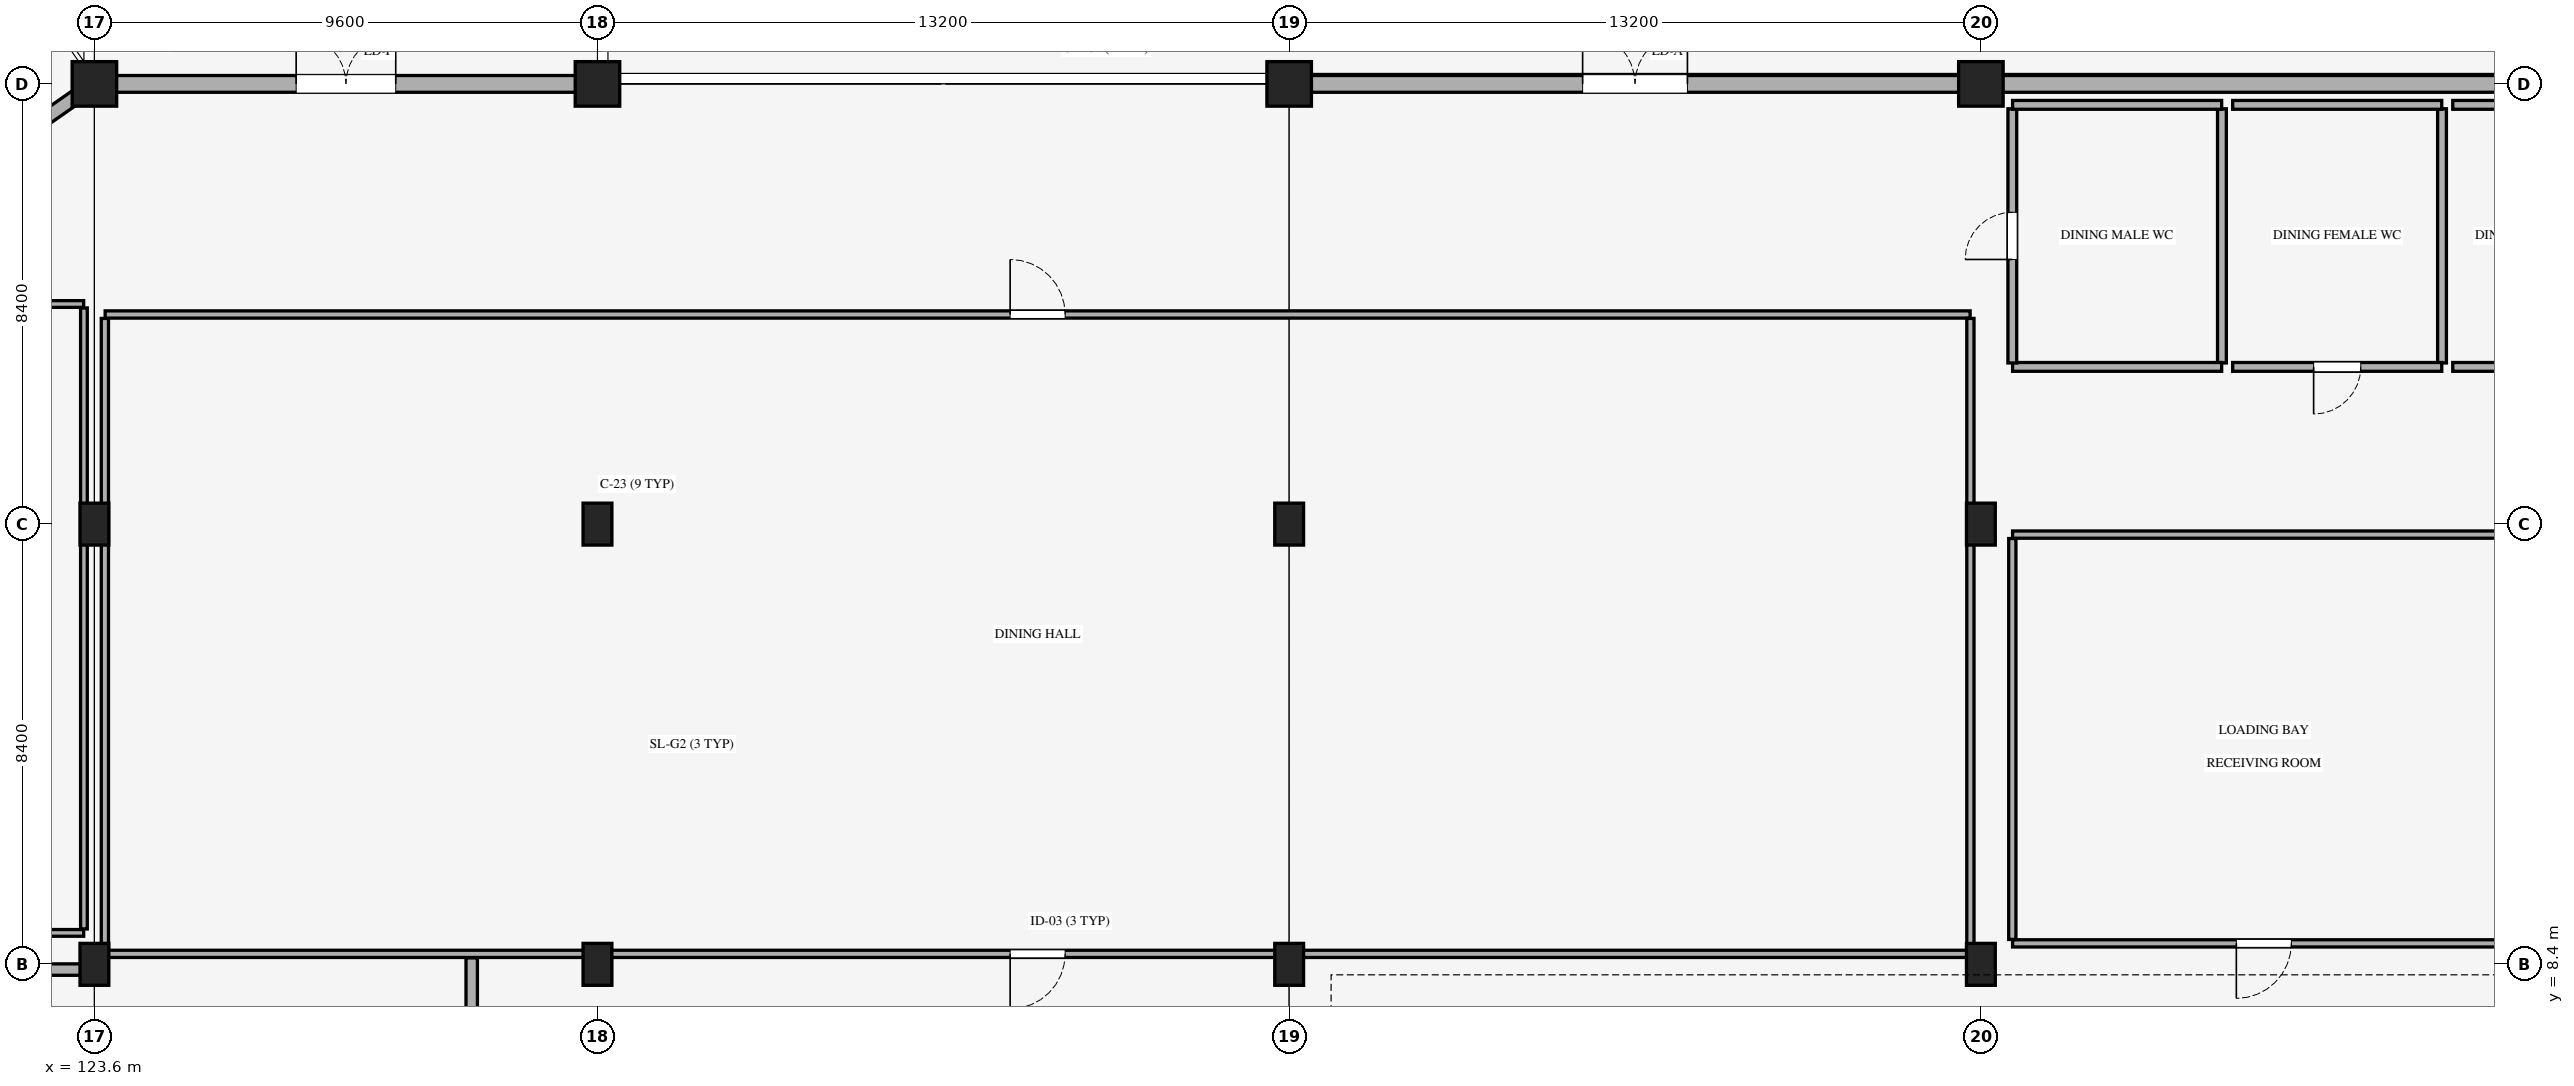
"""IFC4 building model, lengths in metres.
Left out: names, types, materials, properties, quantities, classifications, styles, units other than length and angle.
Written with IfcOpenShell. Run it as: python <this file> out.ifc"""

import sys

from ifc_helpers import new_model, si_unit, direction, frame, frame_2d, origin, origin_2d, place, context, subcontext, project, spatial, rectangle, extrude, element, fill, save


model = new_model("IFC4")
c1 = context("Model", 3, precision=1e-05, world=origin(), true_north=direction((0.0, 1.0)))
c2 = subcontext(c1, "Body", "Model", "MODEL_VIEW")
j1 = project(units=[si_unit("LENGTHUNIT", "METRE"), si_unit("PLANEANGLEUNIT", "RADIAN")], contexts=[c1])
p1 = place(None, origin())
s1 = spatial("IfcSite", under=j1, at=p1, CompositionType="ELEMENT")
p2 = place(p1, origin())
s2 = spatial("IfcBuilding", under=s1, at=p2, CompositionType="ELEMENT")
p3 = place(p2, origin())
s3 = spatial("IfcBuildingStorey", under=s2, at=p3, CompositionType="ELEMENT", Elevation=0.0)
for number, where, z_axis, x_axis in (
    (1, (123.6, 8.4, 0.0), (0.0, 0.0, 1.0), (1.0, 0.0, 0.0)),
    (2, (123.6, 16.8, 0.0), (0.0, 0.0, 1.0), (1.0, 0.0, 0.0)),
):
    element("IfcColumn", number, at=place(p3, frame(where, z_axis=z_axis, x_axis=x_axis)), inside=s3, PredefinedType="COLUMN", context=c2, shape_type="SweptSolid", body=[
        extrude(rectangle(XDim=0.55, YDim=0.8, at=origin_2d()), origin(), (0.0, 0.0, 1.0), 4.8),
    ])
p4 = place(p3, frame((123.6, 25.2, 0.0), z_axis=(0.0, 0.0, 1.0), x_axis=(1.0, 0.0, 0.0)))
e3 = element("IfcColumn", 3, at=p4, inside=s3, PredefinedType="COLUMN", context=c2, shape_type="SweptSolid", body=[
    extrude(rectangle(XDim=0.85, YDim=0.85, at=origin_2d()), origin(), (0.0, 0.0, 1.0), 4.8),
])
for number, where, z_axis, x_axis in (
    (4, (133.2, 8.4, 0.0), (0.0, 0.0, 1.0), (1.0, 0.0, 0.0)),
    (5, (133.2, 16.8, 0.0), (0.0, 0.0, 1.0), (1.0, 0.0, 0.0)),
):
    element("IfcColumn", number, at=place(p3, frame(where, z_axis=z_axis, x_axis=x_axis)), inside=s3, PredefinedType="COLUMN", context=c2, shape_type="SweptSolid", body=[
        extrude(rectangle(XDim=0.55, YDim=0.8, at=origin_2d()), origin(), (0.0, 0.0, 1.0), 4.8),
    ])
p5 = place(p3, frame((133.2, 25.2, 0.0), z_axis=(0.0, 0.0, 1.0), x_axis=(1.0, 0.0, 0.0)))
e6 = element("IfcColumn", 6, at=p5, inside=s3, PredefinedType="COLUMN", context=c2, shape_type="SweptSolid", body=[
    extrude(rectangle(XDim=0.85, YDim=0.85, at=origin_2d()), origin(), (0.0, 0.0, 1.0), 4.8),
])
for number, where, z_axis, x_axis in (
    (7, (146.4, 8.4, 0.0), (0.0, 0.0, 1.0), (1.0, 0.0, 0.0)),
    (8, (146.4, 16.8, 0.0), (0.0, 0.0, 1.0), (1.0, 0.0, 0.0)),
):
    element("IfcColumn", number, at=place(p3, frame(where, z_axis=z_axis, x_axis=x_axis)), inside=s3, PredefinedType="COLUMN", context=c2, shape_type="SweptSolid", body=[
        extrude(rectangle(XDim=0.55, YDim=0.8, at=origin_2d()), origin(), (0.0, 0.0, 1.0), 4.8),
    ])
p6 = place(p3, frame((146.4, 25.2, 0.0), z_axis=(0.0, 0.0, 1.0), x_axis=(1.0, 0.0, 0.0)))
e9 = element("IfcColumn", 9, at=p6, inside=s3, PredefinedType="COLUMN", context=c2, shape_type="SweptSolid", body=[
    extrude(rectangle(XDim=0.85, YDim=0.85, at=origin_2d()), origin(), (0.0, 0.0, 1.0), 4.8),
])
for number, where, z_axis, x_axis in (
    (10, (159.6, 8.4, 0.0), (0.0, 0.0, 1.0), (1.0, 0.0, 0.0)),
    (11, (159.6, 16.8, 0.0), (0.0, 0.0, 1.0), (1.0, 0.0, 0.0)),
):
    element("IfcColumn", number, at=place(p3, frame(where, z_axis=z_axis, x_axis=x_axis)), inside=s3, PredefinedType="COLUMN", context=c2, shape_type="SweptSolid", body=[
        extrude(rectangle(XDim=0.55, YDim=0.8, at=origin_2d()), origin(), (0.0, 0.0, 1.0), 4.8),
    ])
p7 = place(p3, frame((159.6, 25.2, 0.0), z_axis=(0.0, 0.0, 1.0), x_axis=(1.0, 0.0, 0.0)))
e12 = element("IfcColumn", 12, at=p7, inside=s3, PredefinedType="COLUMN", context=c2, shape_type="SweptSolid", body=[
    extrude(rectangle(XDim=0.85, YDim=0.85, at=origin_2d()), origin(), (0.0, 0.0, 1.0), 4.8),
])
p8 = place(p3, frame((121.961, 24.056, 0.0), z_axis=(0.0, 0.0, 1.0), x_axis=(0.819942937555, 0.572445263019, 0.0)))
e13 = element("IfcWall", 13, at=p8, inside=s3, PredefinedType="STANDARD", context=c2, shape_type="SweptSolid", body=[
    extrude(rectangle(XDim=1.999, YDim=0.268, at=frame_2d((0.999, 0.0))), origin(), (0.0, 0.0, 1.0), 2.98),
])
p9 = place(p3, frame((123.6, 25.2, 0.0), z_axis=(0.0, 0.0, 1.0), x_axis=(1.0, 0.0, 0.0)))
e14 = element("IfcWall", 14, at=p9, inside=s3, PredefinedType="STANDARD", context=c2, shape_type="SweptSolid", body=[
    extrude(rectangle(XDim=9.6, YDim=0.32, at=frame_2d((4.8, 0.0))), origin(), (0.0, 0.0, 1.0), 2.98),
])
p10 = place(p9, frame((3.85, 0.0, 0.0)))
e15 = element("IfcOpeningElement", 15, at=p10, cuts=e14, PredefinedType="OPENING", context=c2, shape_type="SweptSolid", body=[
    extrude(rectangle(XDim=1.9, YDim=2.25, at=frame_2d((0.95, 1.125))), frame((0.0, 0.17, 0.0), z_axis=(0.0, -1.0, 0.0), x_axis=(1.0, 0.0, 0.0)), (0.0, 0.0, 1.0), 0.34),
])
p11 = place(p3, frame((146.4, 25.2, 0.0), z_axis=(0.0, 0.0, 1.0), x_axis=(1.0, 0.0, 0.0)))
e16 = element("IfcWall", 16, at=p11, inside=s3, PredefinedType="STANDARD", context=c2, shape_type="SweptSolid", body=[
    extrude(rectangle(XDim=13.2, YDim=0.32, at=frame_2d((6.6, 0.0))), origin(), (0.0, 0.0, 1.0), 3.62),
])
p12 = place(p11, frame((5.6, 0.0, 0.0)))
e17 = element("IfcOpeningElement", 17, at=p12, cuts=e16, PredefinedType="OPENING", context=c2, shape_type="SweptSolid", body=[
    extrude(rectangle(XDim=2.0, YDim=2.4, at=frame_2d((1.0, 1.2))), frame((0.0, 0.17, 0.0), z_axis=(0.0, -1.0, 0.0), x_axis=(1.0, 0.0, 0.0)), (0.0, 0.0, 1.0), 0.34),
])
p13 = place(p3, frame((159.6, 25.2, 0.0), z_axis=(0.0, 0.0, 1.0), x_axis=(1.0, 0.0, 0.0)))
e18 = element("IfcWall", 18, at=p13, inside=s3, PredefinedType="STANDARD", context=c2, shape_type="SweptSolid", body=[
    extrude(rectangle(XDim=13.2, YDim=0.32, at=frame_2d((6.6, 0.0))), origin(), (0.0, 0.0, 1.0), 3.62),
])
p14 = place(p3, frame((117.287, 21.0, 0.0), z_axis=(0.0, 0.0, 1.0), x_axis=(1.0, 0.0, 0.0)))
e19 = element("IfcWall", 19, at=p14, inside=s3, PredefinedType="STANDARD", context=c2, shape_type="SweptSolid", body=[
    extrude(rectangle(XDim=6.108, YDim=0.128, at=frame_2d((3.054, 0.0))), origin(), (0.0, 0.0, 1.0), 3.62),
])
p15 = place(p14, frame((2.454, 0.0, 0.0)))
e20 = element("IfcOpeningElement", 20, at=p15, cuts=e19, PredefinedType="OPENING", context=c2, shape_type="SweptSolid", body=[
    extrude(rectangle(XDim=1.2, YDim=2.18, at=frame_2d((0.6, 1.09))), frame((0.0, 0.074, 0.0), z_axis=(0.0, -1.0, 0.0), x_axis=(1.0, 0.0, 0.0)), (0.0, 0.0, 1.0), 0.148),
])
p16 = place(p3, frame((123.4, 20.925, 0.0), z_axis=(0.0, 0.0, 1.0), x_axis=(0.0, -1.0, 0.0)))
e21 = element("IfcWall", 21, at=p16, inside=s3, PredefinedType="STANDARD", context=c2, shape_type="SweptSolid", body=[
    extrude(rectangle(XDim=11.85, YDim=0.128, at=frame_2d((5.925, 0.0))), origin(), (0.0, 0.0, 1.0), 3.62),
])
p17 = place(p3, frame((123.395, 9.0, 0.0), z_axis=(0.0, 0.0, 1.0), x_axis=(-1.0, 0.0, 0.0)))
e22 = element("IfcWall", 22, at=p17, inside=s3, PredefinedType="STANDARD", context=c2, shape_type="SweptSolid", body=[
    extrude(rectangle(XDim=17.39, YDim=0.128, at=frame_2d((8.695, 0.0))), origin(), (0.0, 0.0, 1.0), 4.02),
])
p18 = place(p3, frame((159.395, 8.6, 0.0), z_axis=(0.0, 0.0, 1.0), x_axis=(-1.0, 0.0, 0.0)))
e23 = element("IfcWall", 23, at=p18, inside=s3, PredefinedType="STANDARD", context=c2, shape_type="SweptSolid", body=[
    extrude(rectangle(XDim=35.59, YDim=0.138, at=frame_2d((17.795, 0.0))), origin(), (0.0, 0.0, 1.0), 3.27),
])
p19 = place(p18, frame((17.27, 0.0, 0.0)))
e24 = element("IfcOpeningElement", 24, at=p19, cuts=e23, PredefinedType="OPENING", context=c2, shape_type="SweptSolid", body=[
    extrude(rectangle(XDim=1.05, YDim=2.15, at=frame_2d((0.525, 1.075))), frame((0.0, 0.079, 0.0), z_axis=(0.0, -1.0, 0.0), x_axis=(1.0, 0.0, 0.0)), (0.0, 0.0, 1.0), 0.158),
])
p20 = place(p3, frame((123.8, 8.675, 0.0), z_axis=(0.0, 0.0, 1.0), x_axis=(0.0, 1.0, 0.0)))
e25 = element("IfcWall", 25, at=p20, inside=s3, PredefinedType="STANDARD", context=c2, shape_type="SweptSolid", body=[
    extrude(rectangle(XDim=12.05, YDim=0.138, at=frame_2d((6.025, 0.0))), origin(), (0.0, 0.0, 1.0), 3.62),
])
p21 = place(p3, frame((123.805, 20.8, 0.0), z_axis=(0.0, 0.0, 1.0), x_axis=(1.0, 0.0, 0.0)))
e26 = element("IfcWall", 26, at=p21, inside=s3, PredefinedType="STANDARD", context=c2, shape_type="SweptSolid", body=[
    extrude(rectangle(XDim=35.59, YDim=0.138, at=frame_2d((17.795, 0.0))), origin(), (0.0, 0.0, 1.0), 3.62),
])
p22 = place(p21, frame((17.27, 0.0, 0.0)))
e27 = element("IfcOpeningElement", 27, at=p22, cuts=e26, PredefinedType="OPENING", context=c2, shape_type="SweptSolid", body=[
    extrude(rectangle(XDim=1.05, YDim=2.15, at=frame_2d((0.525, 1.075))), frame((0.0, 0.079, 0.0), z_axis=(0.0, -1.0, 0.0), x_axis=(1.0, 0.0, 0.0)), (0.0, 0.0, 1.0), 0.158),
])
p23 = place(p3, frame((159.4, 20.725, 0.0), z_axis=(0.0, 0.0, 1.0), x_axis=(0.0, -1.0, 0.0)))
e28 = element("IfcWall", 28, at=p23, inside=s3, PredefinedType="STANDARD", context=c2, shape_type="SweptSolid", body=[
    extrude(rectangle(XDim=12.05, YDim=0.138, at=frame_2d((6.025, 0.0))), origin(), (0.0, 0.0, 1.0), 3.27),
])
p24 = place(p3, frame((130.8, 8.523, 0.0), z_axis=(0.0, 0.0, 1.0), x_axis=(0.0, -1.0, 0.0)))
e29 = element("IfcWall", 29, at=p24, inside=s3, PredefinedType="STANDARD", context=c2, shape_type="SweptSolid", body=[
    extrude(rectangle(XDim=8.048, YDim=0.218, at=frame_2d((4.024, 0.0))), origin(), (0.0, 0.0, 1.0), 3.62),
])
p25 = place(p24, frame((1.463, 0.0, 0.0)))
e30 = element("IfcOpeningElement", 30, at=p25, cuts=e29, PredefinedType="OPENING", context=c2, shape_type="SweptSolid", body=[
    extrude(rectangle(XDim=1.4, YDim=2.2, at=frame_2d((0.7, 1.1))), frame((0.0, 0.119, 0.0), z_axis=(0.0, -1.0, 0.0), x_axis=(1.0, 0.0, 0.0)), (0.0, 0.0, 1.0), 0.238),
])
p26 = place(p3, frame((106.005, 8.3, 0.0), z_axis=(0.0, 0.0, 1.0), x_axis=(1.0, 0.0, 0.0)))
e31 = element("IfcWall", 31, at=p26, inside=s3, PredefinedType="STANDARD", context=c2, shape_type="SweptSolid", body=[
    extrude(rectangle(XDim=17.795, YDim=0.218, at=frame_2d((8.897, 0.0))), origin(), (0.0, 0.0, 1.0), 2.98),
])
p27 = place(p3, frame((169.795, 8.8, 0.0), z_axis=(0.0, 0.0, 1.0), x_axis=(-1.0, 0.0, 0.0)))
e32 = element("IfcWall", 32, at=p27, inside=s3, PredefinedType="STANDARD", context=c2, shape_type="SweptSolid", body=[
    extrude(rectangle(XDim=9.59, YDim=0.138, at=frame_2d((4.795, 0.0))), origin(), (0.0, 0.0, 1.0), 4.49),
])
p28 = place(p27, frame((4.27, 0.0, 0.0)))
e33 = element("IfcOpeningElement", 33, at=p28, cuts=e32, PredefinedType="OPENING", context=c2, shape_type="SweptSolid", body=[
    extrude(rectangle(XDim=1.05, YDim=2.15, at=frame_2d((0.525, 1.075))), frame((0.0, 0.079, 0.0), z_axis=(0.0, -1.0, 0.0), x_axis=(1.0, 0.0, 0.0)), (0.0, 0.0, 1.0), 0.158),
])
p29 = place(p3, frame((160.2, 8.875, 0.0), z_axis=(0.0, 0.0, 1.0), x_axis=(0.0, 1.0, 0.0)))
e34 = element("IfcWall", 34, at=p29, inside=s3, PredefinedType="STANDARD", context=c2, shape_type="SweptSolid", body=[
    extrude(rectangle(XDim=7.65, YDim=0.138, at=frame_2d((3.825, 0.0))), origin(), (0.0, 0.0, 1.0), 4.49),
])
p30 = place(p3, frame((160.205, 16.6, 0.0), z_axis=(0.0, 0.0, 1.0), x_axis=(1.0, 0.0, 0.0)))
e35 = element("IfcWall", 35, at=p30, inside=s3, PredefinedType="STANDARD", context=c2, shape_type="SweptSolid", body=[
    extrude(rectangle(XDim=9.59, YDim=0.138, at=frame_2d((4.795, 0.0))), origin(), (0.0, 0.0, 1.0), 4.49),
])
p31 = place(p3, frame((164.2, 24.725, 0.0), z_axis=(0.0, 0.0, 1.0), x_axis=(0.0, -1.0, 0.0)))
e36 = element("IfcWall", 36, at=p31, inside=s3, PredefinedType="STANDARD", context=c2, shape_type="SweptSolid", body=[
    extrude(rectangle(XDim=4.85, YDim=0.168, at=frame_2d((2.425, 0.0))), origin(), (0.0, 0.0, 1.0), 4.49),
])
p32 = place(p3, frame((164.195, 19.8, 0.0), z_axis=(0.0, 0.0, 1.0), x_axis=(-1.0, 0.0, 0.0)))
e37 = element("IfcWall", 37, at=p32, inside=s3, PredefinedType="STANDARD", context=c2, shape_type="SweptSolid", body=[
    extrude(rectangle(XDim=3.99, YDim=0.168, at=frame_2d((1.995, 0.0))), origin(), (0.0, 0.0, 1.0), 4.49),
])
p33 = place(p3, frame((160.2, 19.875, 0.0), z_axis=(0.0, 0.0, 1.0), x_axis=(0.0, 1.0, 0.0)))
e38 = element("IfcWall", 38, at=p33, inside=s3, PredefinedType="STANDARD", context=c2, shape_type="SweptSolid", body=[
    extrude(rectangle(XDim=4.85, YDim=0.168, at=frame_2d((2.425, 0.0))), origin(), (0.0, 0.0, 1.0), 4.49),
])
p34 = place(p33, frame((1.975, 0.0, 0.0)))
e39 = element("IfcOpeningElement", 39, at=p34, cuts=e38, PredefinedType="OPENING", context=c2, shape_type="SweptSolid", body=[
    extrude(rectangle(XDim=0.9, YDim=2.1, at=frame_2d((0.45, 1.05))), frame((0.0, 0.094, 0.0), z_axis=(0.0, -1.0, 0.0), x_axis=(1.0, 0.0, 0.0)), (0.0, 0.0, 1.0), 0.188),
])
p35 = place(p3, frame((160.205, 24.8, 0.0), z_axis=(0.0, 0.0, 1.0), x_axis=(1.0, 0.0, 0.0)))
e40 = element("IfcWall", 40, at=p35, inside=s3, PredefinedType="STANDARD", context=c2, shape_type="SweptSolid", body=[
    extrude(rectangle(XDim=3.99, YDim=0.168, at=frame_2d((1.995, 0.0))), origin(), (0.0, 0.0, 1.0), 4.49),
])
p36 = place(p3, frame((168.4, 24.725, 0.0), z_axis=(0.0, 0.0, 1.0), x_axis=(0.0, -1.0, 0.0)))
e41 = element("IfcWall", 41, at=p36, inside=s3, PredefinedType="STANDARD", context=c2, shape_type="SweptSolid", body=[
    extrude(rectangle(XDim=4.85, YDim=0.168, at=frame_2d((2.425, 0.0))), origin(), (0.0, 0.0, 1.0), 4.49),
])
p37 = place(p3, frame((168.395, 19.8, 0.0), z_axis=(0.0, 0.0, 1.0), x_axis=(-1.0, 0.0, 0.0)))
e42 = element("IfcWall", 42, at=p37, inside=s3, PredefinedType="STANDARD", context=c2, shape_type="SweptSolid", body=[
    extrude(rectangle(XDim=3.99, YDim=0.168, at=frame_2d((1.995, 0.0))), origin(), (0.0, 0.0, 1.0), 4.49),
])
p38 = place(p37, frame((1.545, 0.0, 0.0)))
e43 = element("IfcOpeningElement", 43, at=p38, cuts=e42, PredefinedType="OPENING", context=c2, shape_type="SweptSolid", body=[
    extrude(rectangle(XDim=0.9, YDim=2.1, at=frame_2d((0.45, 1.05))), frame((0.0, 0.094, 0.0), z_axis=(0.0, -1.0, 0.0), x_axis=(1.0, 0.0, 0.0)), (0.0, 0.0, 1.0), 0.188),
])
p39 = place(p3, frame((164.405, 24.8, 0.0), z_axis=(0.0, 0.0, 1.0), x_axis=(1.0, 0.0, 0.0)))
e44 = element("IfcWall", 44, at=p39, inside=s3, PredefinedType="STANDARD", context=c2, shape_type="SweptSolid", body=[
    extrude(rectangle(XDim=3.99, YDim=0.168, at=frame_2d((1.995, 0.0))), origin(), (0.0, 0.0, 1.0), 4.49),
])
p40 = place(p3, frame((172.395, 19.8, 0.0), z_axis=(0.0, 0.0, 1.0), x_axis=(-1.0, 0.0, 0.0)))
e45 = element("IfcWall", 45, at=p40, inside=s3, PredefinedType="STANDARD", context=c2, shape_type="SweptSolid", body=[
    extrude(rectangle(XDim=3.79, YDim=0.168, at=frame_2d((1.895, 0.0))), origin(), (0.0, 0.0, 1.0), 3.67),
])
p41 = place(p40, frame((1.42, 0.0, 0.0)))
e46 = element("IfcOpeningElement", 46, at=p41, cuts=e45, PredefinedType="OPENING", context=c2, shape_type="SweptSolid", body=[
    extrude(rectangle(XDim=0.95, YDim=2.1, at=frame_2d((0.475, 1.05))), frame((0.0, 0.094, 0.0), z_axis=(0.0, -1.0, 0.0), x_axis=(1.0, 0.0, 0.0)), (0.0, 0.0, 1.0), 0.188),
])
p42 = place(p3, frame((168.605, 24.8, 0.0), z_axis=(0.0, 0.0, 1.0), x_axis=(1.0, 0.0, 0.0)))
e47 = element("IfcWall", 47, at=p42, inside=s3, PredefinedType="STANDARD", context=c2, shape_type="SweptSolid", body=[
    extrude(rectangle(XDim=3.79, YDim=0.168, at=frame_2d((1.895, 0.0))), origin(), (0.0, 0.0, 1.0), 3.67),
])
p43 = place(p10, origin())
e48 = element("IfcDoor", 48, at=p43, inside=s3, OperationType="DOUBLE_DOOR_SINGLE_SWING", PredefinedType="DOOR", context=c2, shape_type="SweptSolid", body=[
    extrude(rectangle(XDim=1.9, YDim=2.25, at=frame_2d((0.95, 1.125))), frame((0.0, 0.025, 0.0), z_axis=(0.0, -1.0, 0.0), x_axis=(1.0, 0.0, 0.0)), (0.0, 0.0, 1.0), 0.05),
])
fill(e15, e48)
p44 = place(p12, origin())
e49 = element("IfcDoor", 49, at=p44, inside=s3, OperationType="DOUBLE_DOOR_SINGLE_SWING", PredefinedType="DOOR", context=c2, shape_type="SweptSolid", body=[
    extrude(rectangle(XDim=2.0, YDim=2.4, at=frame_2d((1.0, 1.2))), frame((0.0, 0.025, 0.0), z_axis=(0.0, -1.0, 0.0), x_axis=(1.0, 0.0, 0.0)), (0.0, 0.0, 1.0), 0.05),
])
fill(e17, e49)
p45 = place(p19, origin())
e50 = element("IfcDoor", 50, at=p45, inside=s3, OperationType="SINGLE_SWING_RIGHT", PredefinedType="DOOR", context=c2, shape_type="SweptSolid", body=[
    extrude(rectangle(XDim=1.05, YDim=2.15, at=frame_2d((0.525, 1.075))), frame((0.0, 0.025, 0.0), z_axis=(0.0, -1.0, 0.0), x_axis=(1.0, 0.0, 0.0)), (0.0, 0.0, 1.0), 0.05),
])
fill(e24, e50)
p46 = place(p22, origin())
e51 = element("IfcDoor", 51, at=p46, inside=s3, OperationType="SINGLE_SWING_LEFT", PredefinedType="DOOR", context=c2, shape_type="SweptSolid", body=[
    extrude(rectangle(XDim=1.05, YDim=2.15, at=frame_2d((0.525, 1.075))), frame((0.0, 0.025, 0.0), z_axis=(0.0, -1.0, 0.0), x_axis=(1.0, 0.0, 0.0)), (0.0, 0.0, 1.0), 0.05),
])
fill(e27, e51)
p47 = place(p28, origin())
e52 = element("IfcDoor", 52, at=p47, inside=s3, OperationType="SINGLE_SWING_RIGHT", PredefinedType="DOOR", context=c2, shape_type="SweptSolid", body=[
    extrude(rectangle(XDim=1.05, YDim=2.15, at=frame_2d((0.525, 1.075))), frame((0.0, 0.025, 0.0), z_axis=(0.0, -1.0, 0.0), x_axis=(1.0, 0.0, 0.0)), (0.0, 0.0, 1.0), 0.05),
])
fill(e33, e52)
p48 = place(p34, origin())
e53 = element("IfcDoor", 53, at=p48, inside=s3, OperationType="SINGLE_SWING_LEFT", PredefinedType="DOOR", context=c2, shape_type="SweptSolid", body=[
    extrude(rectangle(XDim=0.9, YDim=2.1, at=frame_2d((0.45, 1.05))), frame((0.0, 0.025, 0.0), z_axis=(0.0, -1.0, 0.0), x_axis=(1.0, 0.0, 0.0)), (0.0, 0.0, 1.0), 0.05),
])
fill(e39, e53)
p49 = place(p38, origin())
e54 = element("IfcDoor", 54, at=p49, inside=s3, OperationType="SINGLE_SWING_RIGHT", PredefinedType="DOOR", context=c2, shape_type="SweptSolid", body=[
    extrude(rectangle(XDim=0.9, YDim=2.1, at=frame_2d((0.45, 1.05))), frame((0.0, 0.025, 0.0), z_axis=(0.0, -1.0, 0.0), x_axis=(1.0, 0.0, 0.0)), (0.0, 0.0, 1.0), 0.05),
])
fill(e43, e54)
save(model, sys.argv[1])
